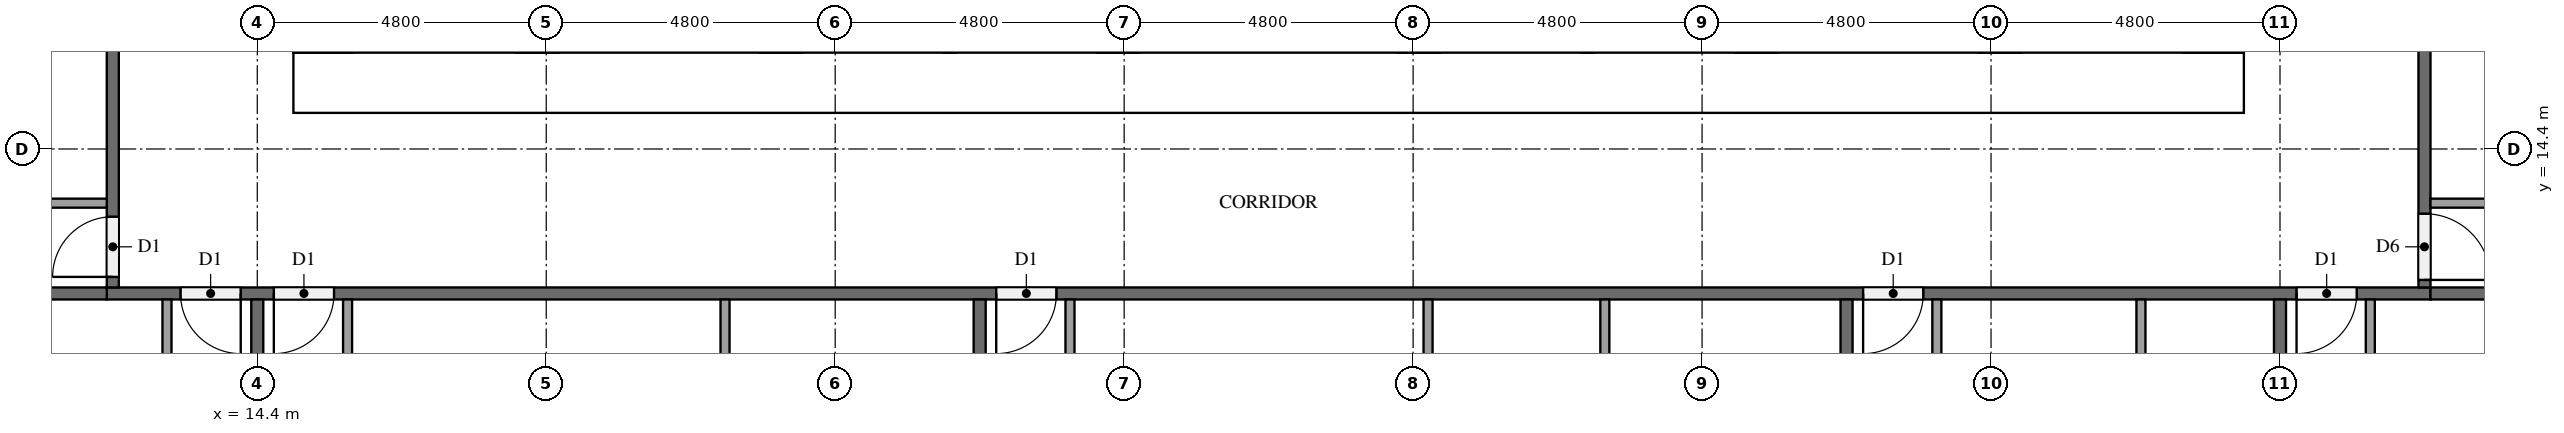
"""IFC4 building model, lengths in metres.
Left out: names, types, materials, properties, quantities, classifications, styles, units other than length and angle.
Written with IfcOpenShell. Run it as: python <this file> out.ifc"""

import sys

from ifc_helpers import new_model, si_unit, direction, frame, frame_2d, origin, place, context, subcontext, project, spatial, rectangle, extrude, element, fill, save


model = new_model("IFC4")
c1 = context("Model", 3, precision=1e-05, world=origin(), true_north=direction((0.0, 1.0)))
c2 = subcontext(c1, "Body", "Model", "MODEL_VIEW")
j1 = project(units=[si_unit("LENGTHUNIT", "METRE"), si_unit("PLANEANGLEUNIT", "RADIAN")], contexts=[c1])
p1 = place(None, origin())
s1 = spatial("IfcSite", under=j1, at=p1, CompositionType="ELEMENT")
p2 = place(p1, origin())
s2 = spatial("IfcBuilding", under=s1, at=p2, CompositionType="ELEMENT")
p3 = place(p2, frame((0.0, 0.0, 32.9)))
s3 = spatial("IfcBuildingStorey", under=s2, at=p3, CompositionType="ELEMENT", Elevation=32.9)
p4 = place(p3, frame((15.0, 15.5, 0.0), z_axis=(0.0, 0.0, 1.0), x_axis=(1.0, 0.0, 0.0)))
e1 = element("IfcWall", 1, at=p4, inside=s3, PredefinedType="SHEAR", context=c2, shape_type="SweptSolid", body=[
    extrude(rectangle(XDim=32.4, YDim=1.0, at=frame_2d((16.2, 0.0))), origin(), (0.0, 0.0, 1.0), 3.2),
])
p5 = place(p4, frame((15.3, 0.0, 0.0)))
e2 = element("IfcOpeningElement", 2, at=p5, cuts=e1, PredefinedType="OPENING", context=c2, shape_type="SweptSolid", body=[
    extrude(rectangle(XDim=1.8, YDim=2.1, at=frame_2d((0.9, 1.05))), frame((0.0, 0.51, 0.0), z_axis=(0.0, -1.0, 0.0), x_axis=(1.0, 0.0, 0.0)), (0.0, 0.0, 1.0), 1.02),
])
p6 = place(p3, frame((15.5, 16.0, 0.0), z_axis=(0.0, 0.0, 1.0), x_axis=(0.0, 1.0, 0.0)))
e3 = element("IfcWall", 3, at=p6, inside=s3, PredefinedType="SHEAR", context=c2, shape_type="SweptSolid", body=[
    extrude(rectangle(XDim=20.8, YDim=1.0, at=frame_2d((10.4, 0.0))), origin(), (0.0, 0.0, 1.0), 3.2),
])
p7 = place(p6, frame((4.76, 0.0, 0.0)))
e4 = element("IfcOpeningElement", 4, at=p7, cuts=e3, PredefinedType="OPENING", context=c2, shape_type="SweptSolid", body=[
    extrude(rectangle(XDim=1.2, YDim=2.1, at=frame_2d((0.6, 1.05))), frame((0.0, 0.51, 0.0), z_axis=(0.0, -1.0, 0.0), x_axis=(1.0, 0.0, 0.0)), (0.0, 0.0, 1.0), 1.02),
])
p8 = place(p3, frame((46.9, 16.0, 0.0), z_axis=(0.0, 0.0, 1.0), x_axis=(0.0, 1.0, 0.0)))
e5 = element("IfcWall", 5, at=p8, inside=s3, PredefinedType="SHEAR", context=c2, shape_type="SweptSolid", body=[
    extrude(rectangle(XDim=20.8, YDim=1.0, at=frame_2d((10.4, 0.0))), origin(), (0.0, 0.0, 1.0), 3.2),
])
p9 = place(p8, frame((10.1, 0.0, 0.0)))
e6 = element("IfcOpeningElement", 6, at=p9, cuts=e5, PredefinedType="OPENING", context=c2, shape_type="SweptSolid", body=[
    extrude(rectangle(XDim=1.2, YDim=2.1, at=frame_2d((0.6, 1.05))), frame((0.0, 0.51, 0.0), z_axis=(0.0, -1.0, 0.0), x_axis=(1.0, 0.0, 0.0)), (0.0, 0.0, 1.0), 1.02),
])
p10 = place(p3, frame((23.1, 16.0, 0.0), z_axis=(0.0, 0.0, 1.0), x_axis=(0.0, 1.0, 0.0)))
e7 = element("IfcWall", 7, at=p10, inside=s3, PredefinedType="SHEAR", context=c2, shape_type="SweptSolid", body=[
    extrude(rectangle(XDim=20.8, YDim=0.7, at=frame_2d((10.4, 0.0))), origin(), (0.0, 0.0, 1.0), 3.2),
])
p11 = place(p3, frame((50.5, 12.0, 0.0), z_axis=(0.0, 0.0, 1.0), x_axis=(-1.0, 0.0, 0.0)))
e8 = element("IfcWall", 8, at=p11, inside=s3, PredefinedType="PARTITIONING", context=c2, shape_type="SweptSolid", body=[
    extrude(rectangle(XDim=38.6, YDim=0.2, at=frame_2d((19.3, 0.0))), origin(), (0.0, 0.0, 1.0), 3.2),
])
p12 = place(p11, frame((36.375, 0.0, 0.0)))
e9 = element("IfcOpeningElement", 9, at=p12, cuts=e8, PredefinedType="OPENING", context=c2, shape_type="SweptSolid", body=[
    extrude(rectangle(XDim=1.0, YDim=2.1, at=frame_2d((0.5, 1.05))), frame((0.0, 0.11, 0.0), z_axis=(0.0, -1.0, 0.0), x_axis=(1.0, 0.0, 0.0)), (0.0, 0.0, 1.0), 0.22),
])
p13 = place(p11, frame((34.825, 0.0, 0.0)))
e10 = element("IfcOpeningElement", 10, at=p13, cuts=e8, PredefinedType="OPENING", context=c2, shape_type="SweptSolid", body=[
    extrude(rectangle(XDim=1.0, YDim=2.1, at=frame_2d((0.5, 1.05))), frame((0.0, 0.11, 0.0), z_axis=(0.0, -1.0, 0.0), x_axis=(1.0, 0.0, 0.0)), (0.0, 0.0, 1.0), 0.22),
])
p14 = place(p11, frame((22.825, 0.0, 0.0)))
e11 = element("IfcOpeningElement", 11, at=p14, cuts=e8, PredefinedType="OPENING", context=c2, shape_type="SweptSolid", body=[
    extrude(rectangle(XDim=1.0, YDim=2.1, at=frame_2d((0.5, 1.05))), frame((0.0, 0.11, 0.0), z_axis=(0.0, -1.0, 0.0), x_axis=(1.0, 0.0, 0.0)), (0.0, 0.0, 1.0), 0.22),
])
p15 = place(p11, frame((8.425, 0.0, 0.0)))
e12 = element("IfcOpeningElement", 12, at=p15, cuts=e8, PredefinedType="OPENING", context=c2, shape_type="SweptSolid", body=[
    extrude(rectangle(XDim=1.0, YDim=2.1, at=frame_2d((0.5, 1.05))), frame((0.0, 0.11, 0.0), z_axis=(0.0, -1.0, 0.0), x_axis=(1.0, 0.0, 0.0)), (0.0, 0.0, 1.0), 0.22),
])
p16 = place(p11, frame((1.225, 0.0, 0.0)))
e13 = element("IfcOpeningElement", 13, at=p16, cuts=e8, PredefinedType="OPENING", context=c2, shape_type="SweptSolid", body=[
    extrude(rectangle(XDim=1.0, YDim=2.1, at=frame_2d((0.5, 1.05))), frame((0.0, 0.11, 0.0), z_axis=(0.0, -1.0, 0.0), x_axis=(1.0, 0.0, 0.0)), (0.0, 0.0, 1.0), 0.22),
])
p17 = place(p3, frame((50.4, 40.7, 0.0), z_axis=(0.0, 0.0, 1.0), x_axis=(0.0, -1.0, 0.0)))
e14 = element("IfcWall", 14, at=p17, inside=s3, PredefinedType="PARTITIONING", context=c2, shape_type="SweptSolid", body=[
    extrude(rectangle(XDim=28.6, YDim=0.2, at=frame_2d((14.3, 0.0))), origin(), (0.0, 0.0, 1.0), 3.2),
])
p18 = place(p17, frame((27.375, 0.0, 0.0)))
e15 = element("IfcOpeningElement", 15, at=p18, cuts=e14, PredefinedType="OPENING", context=c2, shape_type="SweptSolid", body=[
    extrude(rectangle(XDim=1.1, YDim=2.1, at=frame_2d((0.55, 1.05))), frame((0.0, 0.11, 0.0), z_axis=(0.0, -1.0, 0.0), x_axis=(1.0, 0.0, 0.0)), (0.0, 0.0, 1.0), 0.22),
])
p19 = place(p17, frame((8.225, 0.0, 0.0)))
e16 = element("IfcOpeningElement", 16, at=p19, cuts=e14, PredefinedType="OPENING", context=c2, shape_type="SweptSolid", body=[
    extrude(rectangle(XDim=1.0, YDim=2.1, at=frame_2d((0.5, 1.05))), frame((0.0, 0.11, 0.0), z_axis=(0.0, -1.0, 0.0), x_axis=(1.0, 0.0, 0.0)), (0.0, 0.0, 1.0), 0.22),
])
p20 = place(p3, frame((12.0, 12.1, 0.0), z_axis=(0.0, 0.0, 1.0), x_axis=(0.0, 1.0, 0.0)))
e17 = element("IfcWall", 17, at=p20, inside=s3, PredefinedType="PARTITIONING", context=c2, shape_type="SweptSolid", body=[
    extrude(rectangle(XDim=28.6, YDim=0.2, at=frame_2d((14.3, 0.0))), origin(), (0.0, 0.0, 1.0), 3.2),
])
p21 = place(p20, frame((16.975, 0.0, 0.0)))
e18 = element("IfcOpeningElement", 18, at=p21, cuts=e17, PredefinedType="OPENING", context=c2, shape_type="SweptSolid", body=[
    extrude(rectangle(XDim=1.0, YDim=2.1, at=frame_2d((0.5, 1.05))), frame((0.0, 0.11, 0.0), z_axis=(0.0, -1.0, 0.0), x_axis=(1.0, 0.0, 0.0)), (0.0, 0.0, 1.0), 0.22),
])
p22 = place(p20, frame((0.175, 0.0, 0.0)))
e19 = element("IfcOpeningElement", 19, at=p22, cuts=e17, PredefinedType="OPENING", context=c2, shape_type="SweptSolid", body=[
    extrude(rectangle(XDim=1.0, YDim=2.1, at=frame_2d((0.5, 1.05))), frame((0.0, 0.11, 0.0), z_axis=(0.0, -1.0, 0.0), x_axis=(1.0, 0.0, 0.0)), (0.0, 0.0, 1.0), 0.22),
])
p23 = place(p3, frame((14.4, 11.9, 0.0), z_axis=(0.0, 0.0, 1.0), x_axis=(0.0, -1.0, 0.0)))
e20 = element("IfcWall", 20, at=p23, inside=s3, PredefinedType="PARTITIONING", context=c2, shape_type="SweptSolid", body=[
    extrude(rectangle(XDim=11.45, YDim=0.2, at=frame_2d((5.725, 0.0))), origin(), (0.0, 0.0, 1.0), 3.2),
])
for number, where, z_axis, x_axis in (
    (21, (0.1, 12.0, 0.0), (0.0, 0.0, 1.0), (1.0, 0.0, 0.0)),
    (22, (26.4, 11.9, 0.0), (0.0, 0.0, 1.0), (0.0, -1.0, 0.0)),
    (23, (40.8, 11.9, 0.0), (0.0, 0.0, 1.0), (0.0, -1.0, 0.0)),
    (24, (48.0, 11.9, 0.0), (0.0, 0.0, 1.0), (0.0, -1.0, 0.0)),
):
    element("IfcWall", number, at=place(p3, frame(where, z_axis=z_axis, x_axis=x_axis)), inside=s3, PredefinedType="PARTITIONING", context=c2, shape_type="SweptSolid", body=[
        extrude(rectangle(XDim=11.8, YDim=0.2, at=frame_2d((5.9, 0.0))), origin(), (0.0, 0.0, 1.0), 3.2),
    ])
p24 = place(p3, frame((50.5, 12.0, 0.0), z_axis=(0.0, 0.0, 1.0), x_axis=(1.0, 0.0, 0.0)))
e25 = element("IfcWall", 25, at=p24, inside=s3, PredefinedType="PARTITIONING", context=c2, shape_type="SweptSolid", body=[
    extrude(rectangle(XDim=7.0, YDim=0.2, at=frame_2d((3.5, 0.0))), origin(), (0.0, 0.0, 1.0), 3.2),
])
p25 = place(p3, frame((12.9, 11.9, 0.0), z_axis=(0.0, 0.0, 1.0), x_axis=(0.0, -1.0, 0.0)))
e26 = element("IfcWall", 26, at=p25, inside=s3, PredefinedType="PARTITIONING", context=c2, shape_type="SweptSolid", body=[
    extrude(rectangle(XDim=3.125, YDim=0.15, at=frame_2d((1.562, 0.0))), origin(), (0.0, 0.0, 1.0), 3.2),
])
p26 = place(p3, frame((22.17, 11.9, 0.0), z_axis=(0.0, 0.0, 1.0), x_axis=(0.0, -1.0, 0.0)))
e27 = element("IfcWall", 27, at=p26, inside=s3, PredefinedType="PARTITIONING", context=c2, shape_type="SweptSolid", body=[
    extrude(rectangle(XDim=3.725, YDim=0.15, at=frame_2d((1.862, 0.0))), origin(), (0.0, 0.0, 1.0), 3.2),
])
p27 = place(p3, frame((15.9, 11.9, 0.0), z_axis=(0.0, 0.0, 1.0), x_axis=(0.0, -1.0, 0.0)))
e28 = element("IfcWall", 28, at=p27, inside=s3, PredefinedType="PARTITIONING", context=c2, shape_type="SweptSolid", body=[
    extrude(rectangle(XDim=3.875, YDim=0.15, at=frame_2d((1.938, 0.0))), origin(), (0.0, 0.0, 1.0), 3.2),
])
for number, where, z_axis, x_axis in (
    (29, (33.848, 11.9, 0.0), (0.0, 0.0, 1.0), (0.0, -1.0, 0.0)),
    (30, (36.785, 11.9, 0.0), (0.0, 0.0, 1.0), (0.0, -1.0, 0.0)),
):
    element("IfcWall", number, at=place(p3, frame(where, z_axis=z_axis, x_axis=x_axis)), inside=s3, PredefinedType="PARTITIONING", context=c2, shape_type="SweptSolid", body=[
        extrude(rectangle(XDim=3.575, YDim=0.15, at=frame_2d((1.788, 0.0))), origin(), (0.0, 0.0, 1.0), 3.2),
    ])
p28 = place(p3, frame((27.9, 11.9, 0.0), z_axis=(0.0, 0.0, 1.0), x_axis=(0.0, -1.0, 0.0)))
e31 = element("IfcWall", 31, at=p28, inside=s3, PredefinedType="PARTITIONING", context=c2, shape_type="SweptSolid", body=[
    extrude(rectangle(XDim=3.725, YDim=0.15, at=frame_2d((1.862, 0.0))), origin(), (0.0, 0.0, 1.0), 3.2),
])
p29 = place(p3, frame((45.69, 11.9, 0.0), z_axis=(0.0, 0.0, 1.0), x_axis=(0.0, -1.0, 0.0)))
e32 = element("IfcWall", 32, at=p29, inside=s3, PredefinedType="PARTITIONING", context=c2, shape_type="SweptSolid", body=[
    extrude(rectangle(XDim=4.325, YDim=0.15, at=frame_2d((2.163, 0.0))), origin(), (0.0, 0.0, 1.0), 3.2),
])
p30 = place(p3, frame((42.3, 11.9, 0.0), z_axis=(0.0, 0.0, 1.0), x_axis=(0.0, -1.0, 0.0)))
e33 = element("IfcWall", 33, at=p30, inside=s3, PredefinedType="PARTITIONING", context=c2, shape_type="SweptSolid", body=[
    extrude(rectangle(XDim=4.475, YDim=0.15, at=frame_2d((2.237, 0.0))), origin(), (0.0, 0.0, 1.0), 3.2),
])
p31 = place(p3, frame((49.5, 11.9, 0.0), z_axis=(0.0, 0.0, 1.0), x_axis=(0.0, -1.0, 0.0)))
e34 = element("IfcWall", 34, at=p31, inside=s3, PredefinedType="PARTITIONING", context=c2, shape_type="SweptSolid", body=[
    extrude(rectangle(XDim=3.425, YDim=0.15, at=frame_2d((1.712, 0.0))), origin(), (0.0, 0.0, 1.0), 3.2),
])
p32 = place(p3, frame((50.5, 13.5, 0.0), z_axis=(0.0, 0.0, 1.0), x_axis=(1.0, 0.0, 0.0)))
e35 = element("IfcWall", 35, at=p32, inside=s3, PredefinedType="PARTITIONING", context=c2, shape_type="SweptSolid", body=[
    extrude(rectangle(XDim=1.925, YDim=0.15, at=frame_2d((0.962, 0.0))), origin(), (0.0, 0.0, 1.0), 3.2),
])
p33 = place(p3, frame((11.9, 13.5, 0.0), z_axis=(0.0, 0.0, 1.0), x_axis=(-1.0, 0.0, 0.0)))
e36 = element("IfcWall", 36, at=p33, inside=s3, PredefinedType="PARTITIONING", context=c2, shape_type="SweptSolid", body=[
    extrude(rectangle(XDim=4.625, YDim=0.15, at=frame_2d((2.312, 0.0))), origin(), (0.0, 0.0, 1.0), 3.2),
])
p34 = place(p5, frame((1.8, 0.0, 0.0), z_axis=(0.0, 0.0, 1.0), x_axis=(-1.0, 0.0, 0.0)))
e37 = element("IfcDoor", 37, at=p34, inside=s3, OperationType="DOUBLE_DOOR_SINGLE_SWING", PredefinedType="DOOR", context=c2, shape_type="SweptSolid", body=[
    extrude(rectangle(XDim=1.8, YDim=2.1, at=frame_2d((0.9, 1.05))), frame((0.0, 0.025, 0.0), z_axis=(0.0, -1.0, 0.0), x_axis=(1.0, 0.0, 0.0)), (0.0, 0.0, 1.0), 0.05),
])
fill(e2, e37)
p35 = place(p12, origin())
e38 = element("IfcDoor", 38, at=p35, inside=s3, OperationType="SINGLE_SWING_LEFT", PredefinedType="DOOR", context=c2, shape_type="SweptSolid", body=[
    extrude(rectangle(XDim=1.0, YDim=2.1, at=frame_2d((0.5, 1.05))), frame((0.0, 0.025, 0.0), z_axis=(0.0, -1.0, 0.0), x_axis=(1.0, 0.0, 0.0)), (0.0, 0.0, 1.0), 0.05),
])
fill(e9, e38)
p36 = place(p13, origin())
e39 = element("IfcDoor", 39, at=p36, inside=s3, OperationType="SINGLE_SWING_RIGHT", PredefinedType="DOOR", context=c2, shape_type="SweptSolid", body=[
    extrude(rectangle(XDim=1.0, YDim=2.1, at=frame_2d((0.5, 1.05))), frame((0.0, 0.025, 0.0), z_axis=(0.0, -1.0, 0.0), x_axis=(1.0, 0.0, 0.0)), (0.0, 0.0, 1.0), 0.05),
])
fill(e10, e39)
p37 = place(p14, origin())
e40 = element("IfcDoor", 40, at=p37, inside=s3, OperationType="SINGLE_SWING_RIGHT", PredefinedType="DOOR", context=c2, shape_type="SweptSolid", body=[
    extrude(rectangle(XDim=1.0, YDim=2.1, at=frame_2d((0.5, 1.05))), frame((0.0, 0.025, 0.0), z_axis=(0.0, -1.0, 0.0), x_axis=(1.0, 0.0, 0.0)), (0.0, 0.0, 1.0), 0.05),
])
fill(e11, e40)
p38 = place(p15, origin())
e41 = element("IfcDoor", 41, at=p38, inside=s3, OperationType="SINGLE_SWING_RIGHT", PredefinedType="DOOR", context=c2, shape_type="SweptSolid", body=[
    extrude(rectangle(XDim=1.0, YDim=2.1, at=frame_2d((0.5, 1.05))), frame((0.0, 0.025, 0.0), z_axis=(0.0, -1.0, 0.0), x_axis=(1.0, 0.0, 0.0)), (0.0, 0.0, 1.0), 0.05),
])
fill(e12, e41)
p39 = place(p16, origin())
e42 = element("IfcDoor", 42, at=p39, inside=s3, OperationType="SINGLE_SWING_RIGHT", PredefinedType="DOOR", context=c2, shape_type="SweptSolid", body=[
    extrude(rectangle(XDim=1.0, YDim=2.1, at=frame_2d((0.5, 1.05))), frame((0.0, 0.025, 0.0), z_axis=(0.0, -1.0, 0.0), x_axis=(1.0, 0.0, 0.0)), (0.0, 0.0, 1.0), 0.05),
])
fill(e13, e42)
p40 = place(p18, origin())
e43 = element("IfcDoor", 43, at=p40, inside=s3, OperationType="SINGLE_SWING_RIGHT", PredefinedType="DOOR", context=c2, shape_type="SweptSolid", body=[
    extrude(rectangle(XDim=1.1, YDim=2.1, at=frame_2d((0.55, 1.05))), frame((0.0, 0.025, 0.0), z_axis=(0.0, -1.0, 0.0), x_axis=(1.0, 0.0, 0.0)), (0.0, 0.0, 1.0), 0.05),
])
fill(e15, e43)
p41 = place(p22, origin())
e44 = element("IfcDoor", 44, at=p41, inside=s3, OperationType="SINGLE_SWING_LEFT", PredefinedType="DOOR", context=c2, shape_type="SweptSolid", body=[
    extrude(rectangle(XDim=1.0, YDim=2.1, at=frame_2d((0.5, 1.05))), frame((0.0, 0.025, 0.0), z_axis=(0.0, -1.0, 0.0), x_axis=(1.0, 0.0, 0.0)), (0.0, 0.0, 1.0), 0.05),
])
fill(e19, e44)
save(model, sys.argv[1])
